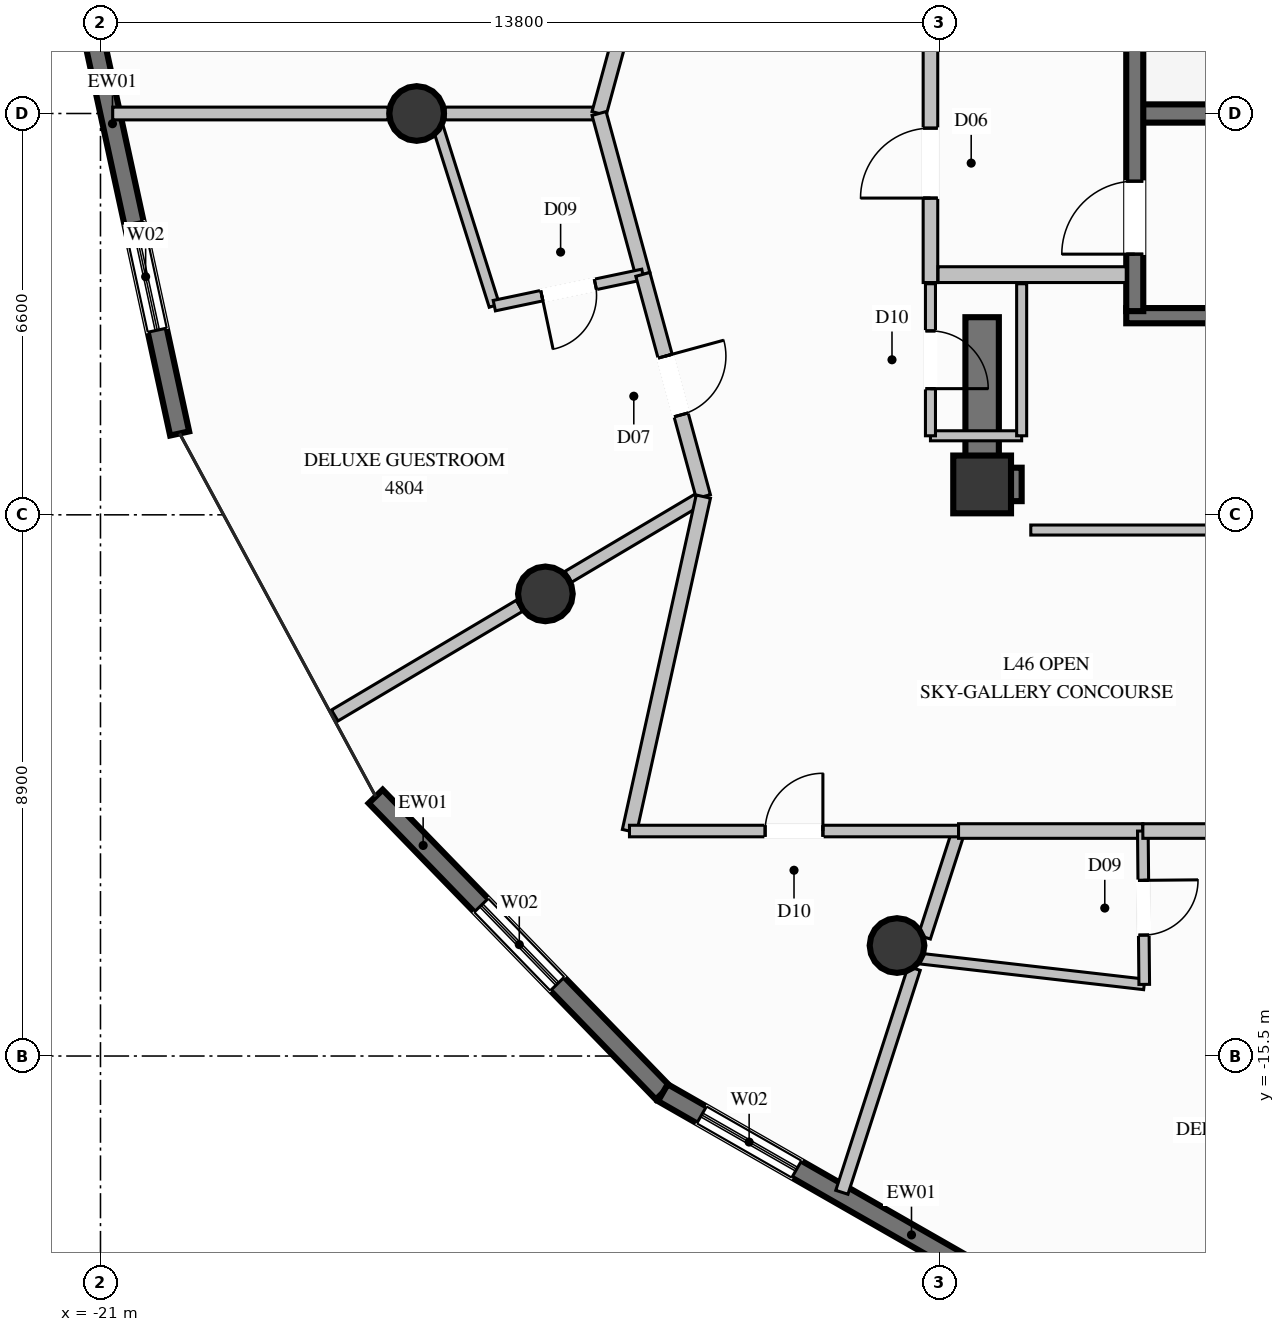
"""IFC4 building model, lengths in metres.
Left out: names, types, materials, properties, quantities, classifications, styles, units other than length and angle.
Written with IfcOpenShell. Run it as: python <this file> out.ifc"""

import sys

from ifc_helpers import new_model, si_unit, direction, frame, frame_2d, origin, origin_2d, place, context, subcontext, project, spatial, rectangle, circle, extrude, element, fill, save


model = new_model("IFC4")
c1 = context("Model", 3, precision=1e-05, world=origin(), true_north=direction((0.0, 1.0)))
c2 = subcontext(c1, "Body", "Model", "MODEL_VIEW")
j1 = project(units=[si_unit("LENGTHUNIT", "METRE"), si_unit("PLANEANGLEUNIT", "RADIAN")], contexts=[c1])
p1 = place(None, origin())
s1 = spatial("IfcSite", under=j1, at=p1, CompositionType="ELEMENT")
p2 = place(p1, origin())
s2 = spatial("IfcBuilding", under=s1, at=p2, CompositionType="ELEMENT")
p3 = place(p2, frame((0.0, 0.0, 180.4)))
s3 = spatial("IfcBuildingStorey", under=s2, at=p3, CompositionType="ELEMENT", Elevation=180.4)
p4 = place(p3, frame((-6.5, -6.1, 0.0), z_axis=(0.0, 0.0, 1.0), x_axis=(1.0, 0.0, 0.0)))
e1 = element("IfcColumn", 1, at=p4, inside=s3, PredefinedType="COLUMN", context=c2, shape_type="SweptSolid", body=[
    extrude(rectangle(XDim=0.95, YDim=0.95, at=origin_2d()), origin(), (0.0, 0.0, 1.0), 3.6),
])
p5 = place(p3, frame((-3.99, 0.0, 0.0), z_axis=(0.0, 0.0, 1.0), x_axis=(1.0, 0.0, 0.0)))
e2 = element("IfcWall", 2, at=p5, inside=s3, PredefinedType="SHEAR", context=c2, shape_type="SweptSolid", body=[
    extrude(rectangle(XDim=7.98, YDim=0.3, at=frame_2d((3.99, 0.0))), origin(), (0.0, 0.0, 1.0), 3.6),
])
p6 = place(p3, frame((-4.13, -3.325, 0.0), z_axis=(0.0, 0.0, 1.0), x_axis=(1.0, 0.0, 0.0)))
e3 = element("IfcWall", 3, at=p6, inside=s3, PredefinedType="SOLIDWALL", context=c2, shape_type="SweptSolid", body=[
    extrude(rectangle(XDim=8.26, YDim=0.25, at=frame_2d((4.13, 0.0))), origin(), (0.0, 0.0, 1.0), 3.6),
])
p7 = place(p3, frame((-6.225, -6.1, 0.0), z_axis=(0.0, 0.0, 1.0), x_axis=(1.0, 0.0, 0.0)))
e4 = element("IfcWall", 4, at=p7, inside=s3, PredefinedType="SHEAR", context=c2, shape_type="SweptSolid", body=[
    extrude(rectangle(XDim=0.375, YDim=0.55, at=frame_2d((0.188, 0.0))), origin(), (0.0, 0.0, 1.0), 3.6),
])
p8 = place(p3, frame((-6.5, -6.375, 0.0), z_axis=(0.0, 0.0, 1.0), x_axis=(0.0, 1.0, 0.0)))
e5 = element("IfcWall", 5, at=p8, inside=s3, PredefinedType="SHEAR", context=c2, shape_type="SweptSolid", body=[
    extrude(rectangle(XDim=3.025, YDim=0.55, at=frame_2d((1.512, 0.0))), origin(), (0.0, 0.0, 1.0), 3.6),
])
for number, where, z_axis, x_axis in (
    (6, (-15.8, 0.0, 0.0), (0.0, 0.0, 1.0), (1.0, 0.0, 0.0)),
    (7, (-13.683, -7.9, 0.0), (0.0, 0.0, 1.0), (1.0, 0.0, 0.0)),
    (8, (-7.9, -13.683, 0.0), (0.0, 0.0, 1.0), (1.0, 0.0, 0.0)),
):
    element("IfcColumn", number, at=place(p3, frame(where, z_axis=z_axis, x_axis=x_axis)), inside=s3, PredefinedType="COLUMN", context=c2, shape_type="SweptSolid", body=[
        extrude(circle(Radius=0.45, at=origin_2d()), origin(), (0.0, 0.0, 1.0), 3.6),
    ])
p9 = place(p3, frame((-19.698, -5.262, 0.0), z_axis=(0.0, 0.0, 1.0), x_axis=(-0.211992849193, 0.977271217161, 0.0)))
e9 = element("IfcWall", 9, at=p9, inside=s3, PredefinedType="SOLIDWALL", context=c2, shape_type="SweptSolid", body=[
    extrude(rectangle(XDim=6.637, YDim=0.32, at=frame_2d((3.318, 0.0))), origin(), (0.0, 0.0, 1.0), 3.36),
])
p10 = place(p9, frame((1.738, 0.0, 0.35)))
e10 = element("IfcOpeningElement", 10, at=p10, cuts=e9, PredefinedType="OPENING", context=c2, shape_type="SweptSolid", body=[
    extrude(rectangle(XDim=1.8, YDim=2.6, at=frame_2d((0.9, 1.3))), frame((0.0, 0.17, 0.0), z_axis=(0.0, -1.0, 0.0), x_axis=(1.0, 0.0, 0.0)), (0.0, 0.0, 1.0), 0.34),
])
p11 = place(p3, frame((-11.751, -16.103, 0.0), z_axis=(0.0, 0.0, 1.0), x_axis=(-0.696119985346, 0.71792545992, 0.0)))
e11 = element("IfcWall", 11, at=p11, inside=s3, PredefinedType="SOLIDWALL", context=c2, shape_type="SweptSolid", body=[
    extrude(rectangle(XDim=6.785, YDim=0.32, at=frame_2d((3.393, 0.0))), origin(), (0.0, 0.0, 1.0), 3.36),
])
p12 = place(p11, frame((2.492, 0.0, 0.35)))
e12 = element("IfcOpeningElement", 12, at=p12, cuts=e11, PredefinedType="OPENING", context=c2, shape_type="SweptSolid", body=[
    extrude(rectangle(XDim=1.8, YDim=2.6, at=frame_2d((0.9, 1.3))), frame((0.0, 0.17, 0.0), z_axis=(0.0, -1.0, 0.0), x_axis=(1.0, 0.0, 0.0)), (0.0, 0.0, 1.0), 0.34),
])
p13 = place(p3, frame((-5.99, -19.398, 0.0), z_axis=(0.0, 0.0, 1.0), x_axis=(-0.868052920032, 0.496471678974, 0.0)))
e13 = element("IfcWall", 13, at=p13, inside=s3, PredefinedType="SOLIDWALL", context=c2, shape_type="SweptSolid", body=[
    extrude(rectangle(XDim=6.637, YDim=0.32, at=frame_2d((3.318, 0.0))), origin(), (0.0, 0.0, 1.0), 3.36),
])
p14 = place(p13, frame((4.102, 0.0, 0.35)))
e14 = element("IfcOpeningElement", 14, at=p14, cuts=e13, PredefinedType="OPENING", context=c2, shape_type="SweptSolid", body=[
    extrude(rectangle(XDim=1.8, YDim=2.6, at=frame_2d((0.9, 1.3))), frame((0.0, 0.17, 0.0), z_axis=(0.0, -1.0, 0.0), x_axis=(1.0, 0.0, 0.0)), (0.0, 0.0, 1.0), 0.34),
])
p15 = place(p3, frame((-3.99, -3.25, 0.0), z_axis=(0.0, 0.0, 1.0), x_axis=(0.0, 1.0, 0.0)))
e15 = element("IfcWall", 15, at=p15, inside=s3, PredefinedType="SOLIDWALL", context=c2, shape_type="SweptSolid", body=[
    extrude(rectangle(XDim=5.46, YDim=0.28, at=frame_2d((2.73, 0.0))), origin(), (0.0, 0.0, 1.0), 3.36),
])
p16 = place(p15, frame((0.937, 0.0, 0.0)))
e16 = element("IfcOpeningElement", 16, at=p16, cuts=e15, PredefinedType="OPENING", context=c2, shape_type="SweptSolid", body=[
    extrude(rectangle(XDim=1.2, YDim=2.2, at=frame_2d((0.6, 1.1))), frame((0.0, 0.15, 0.0), z_axis=(0.0, -1.0, 0.0), x_axis=(1.0, 0.0, 0.0)), (0.0, 0.0, 1.0), 0.3),
])
p17 = place(p3, frame((-7.35, -2.78, 0.0), z_axis=(0.0, 0.0, 1.0), x_axis=(0.0, 1.0, 0.0)))
e17 = element("IfcWall", 17, at=p17, inside=s3, PredefinedType="PARTITIONING", context=c2, shape_type="SweptSolid", body=[
    extrude(rectangle(XDim=5.12, YDim=0.24, at=frame_2d((2.56, 0.0))), origin(), (0.0, 0.0, 1.0), 2.445),
])
p18 = place(p17, frame((1.389, 0.0, 0.0)))
e18 = element("IfcOpeningElement", 18, at=p18, cuts=e17, PredefinedType="OPENING", context=c2, shape_type="SweptSolid", body=[
    extrude(rectangle(XDim=1.15, YDim=2.2, at=frame_2d((0.575, 1.1))), frame((0.0, 0.13, 0.0), z_axis=(0.0, -1.0, 0.0), x_axis=(1.0, 0.0, 0.0)), (0.0, 0.0, 1.0), 0.26),
])
p19 = place(p3, frame((-7.225, -2.65, 0.0), z_axis=(0.0, 0.0, 1.0), x_axis=(1.0, 0.0, 0.0)))
e19 = element("IfcWall", 19, at=p19, inside=s3, PredefinedType="PARTITIONING", context=c2, shape_type="SweptSolid", body=[
    extrude(rectangle(XDim=3.095, YDim=0.26, at=frame_2d((1.548, 0.0))), origin(), (0.0, 0.0, 1.0), 3.36),
])
p20 = place(p3, frame((-7.35, -5.3, 0.0), z_axis=(0.0, 0.0, 1.0), x_axis=(1.0, 0.0, 0.0)))
e20 = element("IfcWall", 20, at=p20, inside=s3, PredefinedType="PARTITIONING", context=c2, shape_type="SweptSolid", body=[
    extrude(rectangle(XDim=1.5, YDim=0.165, at=frame_2d((0.75, 0.0))), origin(), (0.0, 0.0, 1.0), 2.445),
])
p21 = place(p3, frame((-5.85, -5.3, 0.0), z_axis=(0.0, 0.0, 1.0), x_axis=(0.0, 1.0, 0.0)))
e21 = element("IfcWall", 21, at=p21, inside=s3, PredefinedType="PARTITIONING", context=c2, shape_type="SweptSolid", body=[
    extrude(rectangle(XDim=2.5, YDim=0.165, at=frame_2d((1.25, 0.0))), origin(), (0.0, 0.0, 1.0), 2.445),
])
p22 = place(p3, frame((-7.35, -2.8, 0.0), z_axis=(0.0, 0.0, 1.0), x_axis=(0.0, -1.0, 0.0)))
e22 = element("IfcWall", 22, at=p22, inside=s3, PredefinedType="PARTITIONING", context=c2, shape_type="SweptSolid", body=[
    extrude(rectangle(XDim=2.5, YDim=0.165, at=frame_2d((1.25, 0.0))), origin(), (0.0, 0.0, 1.0), 3.36),
])
p23 = place(p22, frame((0.775, 0.0, 0.0)))
e23 = element("IfcOpeningElement", 23, at=p23, cuts=e22, PredefinedType="OPENING", context=c2, shape_type="SweptSolid", body=[
    extrude(rectangle(XDim=0.95, YDim=2.1, at=frame_2d((0.475, 1.05))), frame((0.0, 0.093, 0.0), z_axis=(0.0, -1.0, 0.0), x_axis=(1.0, 0.0, 0.0)), (0.0, 0.0, 1.0), 0.185),
])
p24 = place(p3, frame((-5.7, -6.85, 0.0), z_axis=(0.0, 0.0, 1.0), x_axis=(1.0, 0.0, 0.0)))
e24 = element("IfcWall", 24, at=p24, inside=s3, PredefinedType="PARTITIONING", context=c2, shape_type="SweptSolid", body=[
    extrude(rectangle(XDim=9.65, YDim=0.165, at=frame_2d((4.825, 0.0))), origin(), (0.0, 0.0, 1.0), 2.445),
])
p25 = place(p24, frame((4.35, 0.0, 0.0)))
e25 = element("IfcOpeningElement", 25, at=p25, cuts=e24, PredefinedType="OPENING", context=c2, shape_type="SweptSolid", body=[
    extrude(rectangle(XDim=0.95, YDim=2.1, at=frame_2d((0.475, 1.05))), frame((0.0, 0.093, 0.0), z_axis=(0.0, -1.0, 0.0), x_axis=(1.0, 0.0, 0.0)), (0.0, 0.0, 1.0), 0.185),
])
p26 = place(p3, frame((-12.8, 0.0, 0.0), z_axis=(0.0, 0.0, 1.0), x_axis=(-1.0, 0.0, 0.0)))
e26 = element("IfcWall", 26, at=p26, inside=s3, PredefinedType="PARTITIONING", context=c2, shape_type="SweptSolid", body=[
    extrude(rectangle(XDim=2.53, YDim=0.21, at=frame_2d((1.265, 0.0))), origin(), (0.0, 0.0, 1.0), 3.36),
])
p27 = place(p3, frame((-16.27, 0.0, 0.0), z_axis=(0.0, 0.0, 1.0), x_axis=(-1.0, 0.0, 0.0)))
e27 = element("IfcWall", 27, at=p27, inside=s3, PredefinedType="PARTITIONING", context=c2, shape_type="SweptSolid", body=[
    extrude(rectangle(XDim=4.529, YDim=0.21, at=frame_2d((2.265, 0.0))), origin(), (0.0, 0.0, 1.0), 3.36),
])
p28 = place(p3, frame((-11.085, -6.3, 0.0), z_axis=(0.0, 0.0, 1.0), x_axis=(-0.859827513331, -0.510584613281, 0.0)))
e28 = element("IfcWall", 28, at=p28, inside=s3, PredefinedType="PARTITIONING", context=c2, shape_type="SweptSolid", body=[
    extrude(rectangle(XDim=2.583, YDim=0.21, at=frame_2d((1.292, 0.0))), origin(), (0.0, 0.0, 1.0), 2.801),
])
p29 = place(p3, frame((-14.11, -8.096, 0.0), z_axis=(0.0, 0.0, 1.0), x_axis=(-0.859825355727, -0.510588246682, 0.0)))
e29 = element("IfcWall", 29, at=p29, inside=s3, PredefinedType="PARTITIONING", context=c2, shape_type="SweptSolid", body=[
    extrude(rectangle(XDim=3.533, YDim=0.21, at=frame_2d((1.767, 0.0))), origin(), (0.0, 0.0, 1.0), 3.36),
])
p30 = place(p3, frame((-11.805, 3.654, 0.0), z_axis=(0.0, 0.0, 1.0), x_axis=(-0.262762825819, -0.964860454868, 0.0)))
e30 = element("IfcWall", 30, at=p30, inside=s3, PredefinedType="PARTITIONING", context=c2, shape_type="SweptSolid", body=[
    extrude(rectangle(XDim=3.787, YDim=0.24, at=frame_2d((1.894, 0.0))), origin(), (0.0, 0.0, 1.0), 3.36),
])
p31 = place(p30, frame((1.394, 0.0, 0.0)))
e31 = element("IfcOpeningElement", 31, at=p31, cuts=e30, PredefinedType="OPENING", context=c2, shape_type="SweptSolid", body=[
    extrude(rectangle(XDim=1.0, YDim=2.2, at=frame_2d((0.5, 1.1))), frame((0.0, 0.13, 0.0), z_axis=(0.0, -1.0, 0.0), x_axis=(1.0, 0.0, 0.0)), (0.0, 0.0, 1.0), 0.26),
])
p32 = place(p3, frame((-12.8, 0.0, 0.0), z_axis=(0.0, 0.0, 1.0), x_axis=(0.262552356383, -0.964917747872, 0.0)))
e32 = element("IfcWall", 32, at=p32, inside=s3, PredefinedType="PARTITIONING", context=c2, shape_type="SweptSolid", body=[
    extrude(rectangle(XDim=2.742, YDim=0.24, at=frame_2d((1.371, 0.0))), origin(), (0.0, 0.0, 1.0), 3.36),
])
p33 = place(p3, frame((-15.52, 0.0, 0.0), z_axis=(0.0, 0.0, 1.0), x_axis=(0.300912730095, -0.953651681101, 0.0)))
e33 = element("IfcWall", 33, at=p33, inside=s3, PredefinedType="PLUMBINGWALL", context=c2, shape_type="SweptSolid", body=[
    extrude(rectangle(XDim=3.313, YDim=0.175, at=frame_2d((1.657, 0.0))), origin(), (0.0, 0.0, 1.0), 2.929),
])
p34 = place(p3, frame((-12.08, -2.646, 0.0), z_axis=(0.0, 0.0, 1.0), x_axis=(-0.978579866642, -0.205867541403, 0.0)))
e34 = element("IfcWall", 34, at=p34, inside=s3, PredefinedType="PLUMBINGWALL", context=c2, shape_type="SweptSolid", body=[
    extrude(rectangle(XDim=2.496, YDim=0.175, at=frame_2d((1.248, 0.0))), origin(), (0.0, 0.0, 1.0), 3.36),
])
p35 = place(p34, frame((0.798, 0.0, 0.0)))
e35 = element("IfcOpeningElement", 35, at=p35, cuts=e34, PredefinedType="OPENING", context=c2, shape_type="SweptSolid", body=[
    extrude(rectangle(XDim=0.9, YDim=2.1, at=frame_2d((0.45, 1.05))), frame((0.0, 0.098, 0.0), z_axis=(0.0, -1.0, 0.0), x_axis=(1.0, 0.0, 0.0)), (0.0, 0.0, 1.0), 0.195),
])
p36 = place(p3, frame((-12.08, -2.646, 0.0), z_axis=(0.0, 0.0, 1.0), x_axis=(0.262762825819, -0.964860454868, 0.0)))
e36 = element("IfcWall", 36, at=p36, inside=s3, PredefinedType="PARTITIONING", context=c2, shape_type="SweptSolid", body=[
    extrude(rectangle(XDim=3.787, YDim=0.24, at=frame_2d((1.894, 0.0))), origin(), (0.0, 0.0, 1.0), 3.36),
])
p37 = place(p36, frame((1.394, 0.0, 0.0)))
e37 = element("IfcOpeningElement", 37, at=p37, cuts=e36, PredefinedType="OPENING", context=c2, shape_type="SweptSolid", body=[
    extrude(rectangle(XDim=1.0, YDim=2.2, at=frame_2d((0.5, 1.1))), frame((0.0, 0.13, 0.0), z_axis=(0.0, -1.0, 0.0), x_axis=(1.0, 0.0, 0.0)), (0.0, 0.0, 1.0), 0.26),
])
p38 = place(p3, frame((-6.888, -11.8, 0.0), z_axis=(0.0, 0.0, 1.0), x_axis=(-0.307220756357, -0.95163827522, 0.0)))
e38 = element("IfcWall", 38, at=p38, inside=s3, PredefinedType="PARTITIONING", context=c2, shape_type="SweptSolid", body=[
    extrude(rectangle(XDim=1.833, YDim=0.21, at=frame_2d((0.916, 0.0))), origin(), (0.0, 0.0, 1.0), 2.801),
])
p39 = place(p3, frame((-7.618, -14.059, 0.0), z_axis=(0.0, 0.0, 1.0), x_axis=(-0.307297747986, -0.9516134163, 0.0)))
e39 = element("IfcWall", 39, at=p39, inside=s3, PredefinedType="PARTITIONING", context=c2, shape_type="SweptSolid", body=[
    extrude(rectangle(XDim=3.869, YDim=0.21, at=frame_2d((1.935, 0.0))), origin(), (0.0, 0.0, 1.0), 3.36),
])
p40 = place(p3, frame((-11.085, -6.3, 0.0), z_axis=(0.0, 0.0, 1.0), x_axis=(-0.21572328796, -0.976454537104, 0.0)))
e40 = element("IfcWall", 40, at=p40, inside=s3, PredefinedType="PARTITIONING", context=c2, shape_type="SweptSolid", body=[
    extrude(rectangle(XDim=5.633, YDim=0.24, at=frame_2d((2.816, 0.0))), origin(), (0.0, 0.0, 1.0), 3.36),
])
p41 = place(p3, frame((-12.3, -11.8, 0.0), z_axis=(0.0, 0.0, 1.0), x_axis=(1.0, 0.0, 0.0)))
e41 = element("IfcWall", 41, at=p41, inside=s3, PredefinedType="PARTITIONING", context=c2, shape_type="SweptSolid", body=[
    extrude(rectangle(XDim=5.412, YDim=0.19, at=frame_2d((2.706, 0.0))), origin(), (0.0, 0.0, 1.0), 3.36),
])
p42 = place(p41, frame((2.231, 0.0, 0.0)))
e42 = element("IfcOpeningElement", 42, at=p42, cuts=e41, PredefinedType="OPENING", context=c2, shape_type="SweptSolid", body=[
    extrude(rectangle(XDim=0.95, YDim=2.1, at=frame_2d((0.475, 1.05))), frame((0.0, 0.105, 0.0), z_axis=(0.0, -1.0, 0.0), x_axis=(1.0, 0.0, 0.0)), (0.0, 0.0, 1.0), 0.21),
])
p43 = place(p3, frame((-6.888, -11.8, 0.0), z_axis=(0.0, 0.0, 1.0), x_axis=(1.0, 0.0, 0.0)))
e43 = element("IfcWall", 43, at=p43, inside=s3, PredefinedType="PARTITIONING", context=c2, shape_type="SweptSolid", body=[
    extrude(rectangle(XDim=3.031, YDim=0.24, at=frame_2d((1.516, 0.0))), origin(), (0.0, 0.0, 1.0), 3.36),
])
p44 = place(p3, frame((-7.564, -13.893, 0.0), z_axis=(0.0, 0.0, 1.0), x_axis=(0.993452151759, -0.114248948203, 0.0)))
e44 = element("IfcWall", 44, at=p44, inside=s3, PredefinedType="PLUMBINGWALL", context=c2, shape_type="SweptSolid", body=[
    extrude(rectangle(XDim=3.755, YDim=0.175, at=frame_2d((1.877, 0.0))), origin(), (0.0, 0.0, 1.0), 2.929),
])
p45 = place(p3, frame((-3.857, -11.8, 0.0), z_axis=(0.0, 0.0, 1.0), x_axis=(0.009099332858, -0.999958600214, 0.0)))
e45 = element("IfcWall", 45, at=p45, inside=s3, PredefinedType="PLUMBINGWALL", context=c2, shape_type="SweptSolid", body=[
    extrude(rectangle(XDim=2.522, YDim=0.175, at=frame_2d((1.261, 0.0))), origin(), (0.0, 0.0, 1.0), 3.36),
])
p46 = place(p45, frame((0.811, 0.0, 0.0)))
e46 = element("IfcOpeningElement", 46, at=p46, cuts=e45, PredefinedType="OPENING", context=c2, shape_type="SweptSolid", body=[
    extrude(rectangle(XDim=0.9, YDim=2.1, at=frame_2d((0.45, 1.05))), frame((0.0, 0.098, 0.0), z_axis=(0.0, -1.0, 0.0), x_axis=(1.0, 0.0, 0.0)), (0.0, 0.0, 1.0), 0.195),
])
p47 = place(p3, frame((-3.857, -11.8, 0.0), z_axis=(0.0, 0.0, 1.0), x_axis=(1.0, 0.0, 0.0)))
e47 = element("IfcWall", 47, at=p47, inside=s3, PredefinedType="PARTITIONING", context=c2, shape_type="SweptSolid", body=[
    extrude(rectangle(XDim=3.857, YDim=0.24, at=frame_2d((1.928, 0.0))), origin(), (0.0, 0.0, 1.0), 3.36),
])
p48 = place(p47, frame((1.429, 0.0, 0.0)))
e48 = element("IfcOpeningElement", 48, at=p48, cuts=e47, PredefinedType="OPENING", context=c2, shape_type="SweptSolid", body=[
    extrude(rectangle(XDim=1.0, YDim=2.2, at=frame_2d((0.5, 1.1))), frame((0.0, 0.13, 0.0), z_axis=(0.0, -1.0, 0.0), x_axis=(1.0, 0.0, 0.0)), (0.0, 0.0, 1.0), 0.26),
])
p49 = place(p10, origin())
e49 = element("IfcWindow", 49, at=p49, inside=s3, PartitioningType="SINGLE_PANEL", PredefinedType="WINDOW", context=c2, shape_type="SweptSolid", body=[
    extrude(rectangle(XDim=1.8, YDim=2.6, at=frame_2d((0.9, 1.3))), frame((0.0, 0.03, 0.0), z_axis=(0.0, -1.0, 0.0), x_axis=(1.0, 0.0, 0.0)), (0.0, 0.0, 1.0), 0.06),
])
fill(e10, e49)
p50 = place(p12, origin())
e50 = element("IfcWindow", 50, at=p50, inside=s3, PartitioningType="SINGLE_PANEL", PredefinedType="WINDOW", context=c2, shape_type="SweptSolid", body=[
    extrude(rectangle(XDim=1.8, YDim=2.6, at=frame_2d((0.9, 1.3))), frame((0.0, 0.03, 0.0), z_axis=(0.0, -1.0, 0.0), x_axis=(1.0, 0.0, 0.0)), (0.0, 0.0, 1.0), 0.06),
])
fill(e12, e50)
p51 = place(p14, origin())
e51 = element("IfcWindow", 51, at=p51, inside=s3, PartitioningType="SINGLE_PANEL", PredefinedType="WINDOW", context=c2, shape_type="SweptSolid", body=[
    extrude(rectangle(XDim=1.8, YDim=2.6, at=frame_2d((0.9, 1.3))), frame((0.0, 0.03, 0.0), z_axis=(0.0, -1.0, 0.0), x_axis=(1.0, 0.0, 0.0)), (0.0, 0.0, 1.0), 0.06),
])
fill(e14, e51)
p52 = place(p16, origin())
e52 = element("IfcDoor", 52, at=p52, inside=s3, OperationType="SINGLE_SWING_LEFT", PredefinedType="DOOR", context=c2, shape_type="SweptSolid", body=[
    extrude(rectangle(XDim=1.2, YDim=2.2, at=frame_2d((0.6, 1.1))), frame((0.0, 0.025, 0.0), z_axis=(0.0, -1.0, 0.0), x_axis=(1.0, 0.0, 0.0)), (0.0, 0.0, 1.0), 0.05),
])
fill(e16, e52)
p53 = place(p18, origin())
e53 = element("IfcDoor", 53, at=p53, inside=s3, OperationType="SINGLE_SWING_LEFT", PredefinedType="DOOR", context=c2, shape_type="SweptSolid", body=[
    extrude(rectangle(XDim=1.15, YDim=2.2, at=frame_2d((0.575, 1.1))), frame((0.0, 0.025, 0.0), z_axis=(0.0, -1.0, 0.0), x_axis=(1.0, 0.0, 0.0)), (0.0, 0.0, 1.0), 0.05),
])
fill(e18, e53)
p54 = place(p23, origin())
e54 = element("IfcDoor", 54, at=p54, inside=s3, OperationType="SINGLE_SWING_RIGHT", PredefinedType="DOOR", context=c2, shape_type="SweptSolid", body=[
    extrude(rectangle(XDim=0.95, YDim=2.1, at=frame_2d((0.475, 1.05))), frame((0.0, 0.025, 0.0), z_axis=(0.0, -1.0, 0.0), x_axis=(1.0, 0.0, 0.0)), (0.0, 0.0, 1.0), 0.05),
])
fill(e23, e54)
p55 = place(p35, origin())
e55 = element("IfcDoor", 55, at=p55, inside=s3, OperationType="SINGLE_SWING_RIGHT", PredefinedType="DOOR", context=c2, shape_type="SweptSolid", body=[
    extrude(rectangle(XDim=0.9, YDim=2.1, at=frame_2d((0.45, 1.05))), frame((0.0, 0.025, 0.0), z_axis=(0.0, -1.0, 0.0), x_axis=(1.0, 0.0, 0.0)), (0.0, 0.0, 1.0), 0.05),
])
fill(e35, e55)
p56 = place(p37, origin())
e56 = element("IfcDoor", 56, at=p56, inside=s3, OperationType="SINGLE_SWING_LEFT", PredefinedType="DOOR", context=c2, shape_type="SweptSolid", body=[
    extrude(rectangle(XDim=1.0, YDim=2.2, at=frame_2d((0.5, 1.1))), frame((0.0, 0.025, 0.0), z_axis=(0.0, -1.0, 0.0), x_axis=(1.0, 0.0, 0.0)), (0.0, 0.0, 1.0), 0.05),
])
fill(e37, e56)
p57 = place(p42, origin())
e57 = element("IfcDoor", 57, at=p57, inside=s3, OperationType="SINGLE_SWING_RIGHT", PredefinedType="DOOR", context=c2, shape_type="SweptSolid", body=[
    extrude(rectangle(XDim=0.95, YDim=2.1, at=frame_2d((0.475, 1.05))), frame((0.0, 0.025, 0.0), z_axis=(0.0, -1.0, 0.0), x_axis=(1.0, 0.0, 0.0)), (0.0, 0.0, 1.0), 0.05),
])
fill(e42, e57)
p58 = place(p46, origin())
e58 = element("IfcDoor", 58, at=p58, inside=s3, OperationType="SINGLE_SWING_LEFT", PredefinedType="DOOR", context=c2, shape_type="SweptSolid", body=[
    extrude(rectangle(XDim=0.9, YDim=2.1, at=frame_2d((0.45, 1.05))), frame((0.0, 0.025, 0.0), z_axis=(0.0, -1.0, 0.0), x_axis=(1.0, 0.0, 0.0)), (0.0, 0.0, 1.0), 0.05),
])
fill(e46, e58)
save(model, sys.argv[1])
